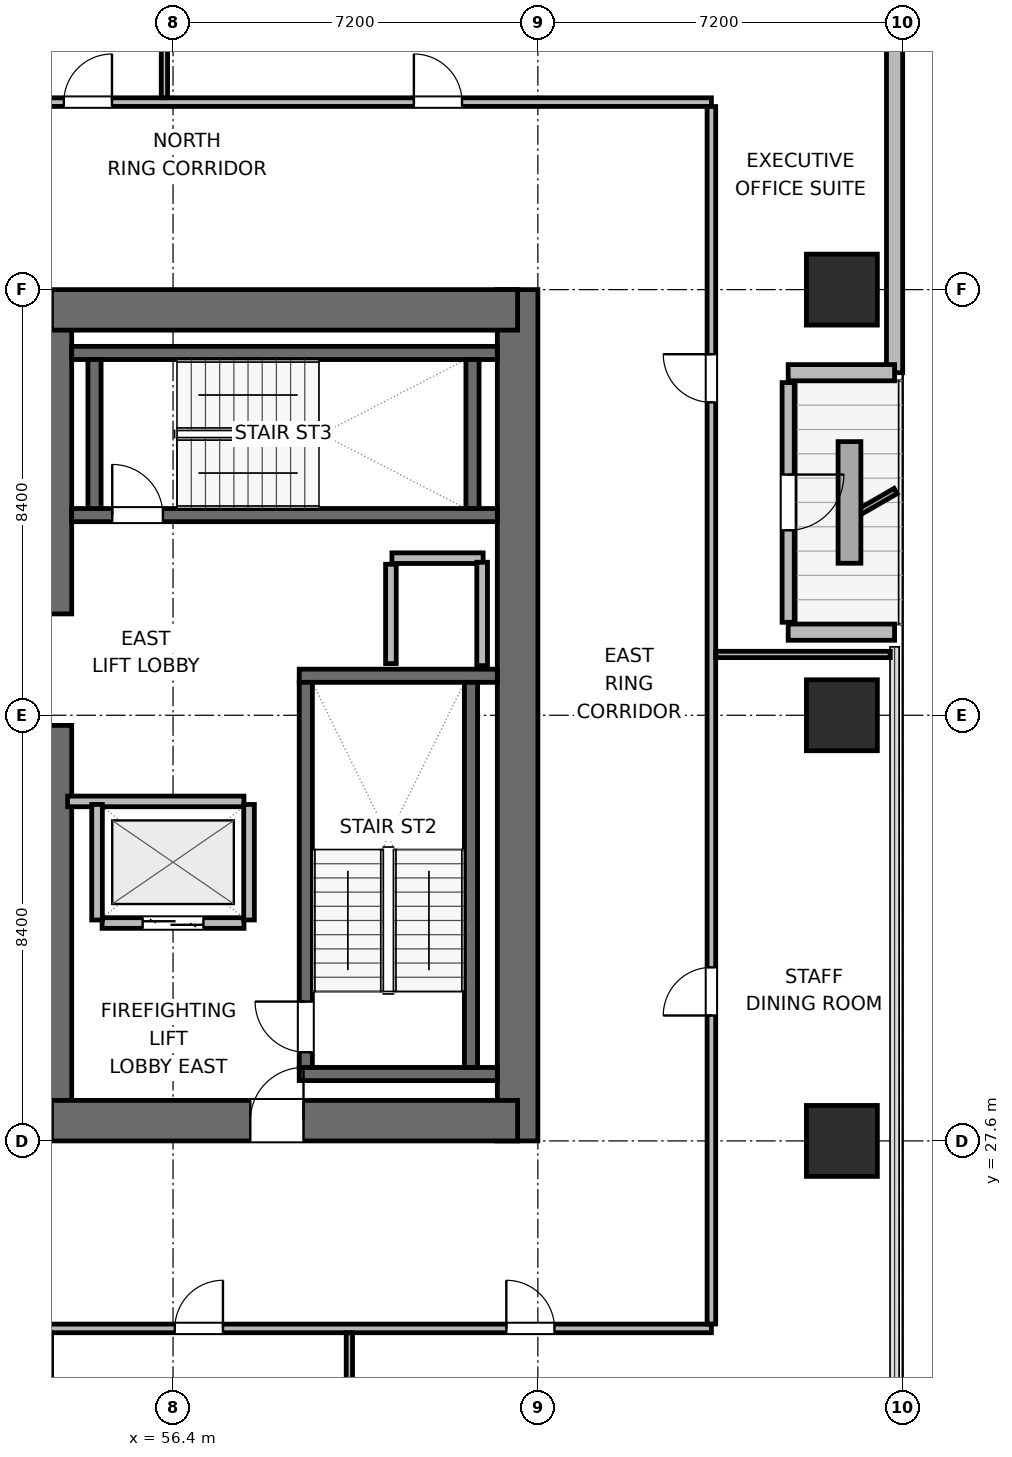
"""IFC4 building model, lengths in metres.
Left out: names, types, materials, properties, quantities, classifications, styles, units other than length and angle.
Written with IfcOpenShell. Run it as: python <this file> out.ifc"""

import sys

from ifc_helpers import new_model, si_unit, direction, frame, frame_2d, origin, origin_2d, place, context, subcontext, project, spatial, rectangle, extrude, element, fill, save


model = new_model("IFC4")
c1 = context("Model", 3, precision=1e-05, world=origin(), true_north=direction((0.0, 1.0)))
c2 = subcontext(c1, "Body", "Model", "MODEL_VIEW")
j1 = project(units=[si_unit("LENGTHUNIT", "METRE"), si_unit("PLANEANGLEUNIT", "RADIAN")], contexts=[c1])
p1 = place(None, origin())
s1 = spatial("IfcSite", under=j1, at=p1, CompositionType="ELEMENT")
p2 = place(p1, origin())
s2 = spatial("IfcBuilding", under=s1, at=p2, CompositionType="ELEMENT")
p3 = place(p2, frame((0.0, 0.0, 105.3)))
s3 = spatial("IfcBuildingStorey", under=s2, at=p3, CompositionType="ELEMENT", Elevation=105.3)
p4 = place(p3, frame((54.0, 28.0, 0.0), z_axis=(0.0, 0.0, 1.0), x_axis=(0.0, 1.0, 0.0)))
e1 = element("IfcWall", 1, at=p4, inside=s3, PredefinedType="SHEAR", context=c2, shape_type="SweptSolid", body=[
    extrude(rectangle(XDim=7.8, YDim=0.8, at=frame_2d((3.9, 0.0))), origin(), (0.0, 0.0, 1.0), 3.9),
])
p5 = place(p3, frame((54.0, 38.0, 0.0), z_axis=(0.0, 0.0, 1.0), x_axis=(0.0, 1.0, 0.0)))
e2 = element("IfcWall", 2, at=p5, inside=s3, PredefinedType="SHEAR", context=c2, shape_type="SweptSolid", body=[
    extrude(rectangle(XDim=6.0, YDim=0.8, at=frame_2d((3.0, 0.0))), origin(), (0.0, 0.0, 1.0), 3.9),
])
p6 = place(p3, frame((63.2, 27.6, 0.0), z_axis=(0.0, 0.0, 1.0), x_axis=(0.0, 1.0, 0.0)))
e3 = element("IfcWall", 3, at=p6, inside=s3, PredefinedType="SHEAR", context=c2, shape_type="SweptSolid", body=[
    extrude(rectangle(XDim=16.8, YDim=0.8, at=frame_2d((8.4, 0.0))), origin(), (0.0, 0.0, 1.0), 3.9),
])
p7 = place(p3, frame((54.0, 28.0, 0.0), z_axis=(0.0, 0.0, 1.0), x_axis=(1.0, 0.0, 0.0)))
e4 = element("IfcWall", 4, at=p7, inside=s3, PredefinedType="SHEAR", context=c2, shape_type="SweptSolid", body=[
    extrude(rectangle(XDim=9.2, YDim=0.8, at=frame_2d((4.6, 0.0))), origin(), (0.0, 0.0, 1.0), 3.9),
])
p8 = place(p7, frame((3.925, 0.0, 0.0)))
e5 = element("IfcOpeningElement", 5, at=p8, cuts=e4, PredefinedType="OPENING", context=c2, shape_type="SweptSolid", body=[
    extrude(rectangle(XDim=1.05, YDim=2.04, at=frame_2d((0.525, 1.02))), frame((0.0, 0.41, 0.0), z_axis=(0.0, -1.0, 0.0), x_axis=(1.0, 0.0, 0.0)), (0.0, 0.0, 1.0), 0.82),
])
p9 = place(p3, frame((54.0, 44.0, 0.0), z_axis=(0.0, 0.0, 1.0), x_axis=(1.0, 0.0, 0.0)))
e6 = element("IfcWall", 6, at=p9, inside=s3, PredefinedType="SHEAR", context=c2, shape_type="SweptSolid", body=[
    extrude(rectangle(XDim=9.2, YDim=0.8, at=frame_2d((4.6, 0.0))), origin(), (0.0, 0.0, 1.0), 3.9),
])
for number, where, z_axis, x_axis in (
    (7, (58.89, 28.92, 0.0), (0.0, 0.0, 1.0), (1.0, 0.0, 0.0)),
    (8, (58.89, 36.78, 0.0), (0.0, 0.0, 1.0), (1.0, 0.0, 0.0)),
):
    element("IfcWall", number, at=place(p3, frame(where, z_axis=z_axis, x_axis=x_axis)), inside=s3, PredefinedType="SHEAR", context=c2, shape_type="SweptSolid", body=[
        extrude(rectangle(XDim=3.91, YDim=0.26, at=frame_2d((1.955, 0.0))), origin(), (0.0, 0.0, 1.0), 3.9),
    ])
p10 = place(p3, frame((59.02, 29.05, 0.0), z_axis=(0.0, 0.0, 1.0), x_axis=(0.0, 1.0, 0.0)))
e9 = element("IfcWall", 9, at=p10, inside=s3, PredefinedType="SHEAR", context=c2, shape_type="SweptSolid", body=[
    extrude(rectangle(XDim=7.6, YDim=0.26, at=frame_2d((3.8, 0.0))), origin(), (0.0, 0.0, 1.0), 3.9),
])
p11 = place(p10, frame((0.3, 0.0, 0.0)))
e10 = element("IfcOpeningElement", 10, at=p11, cuts=e9, PredefinedType="OPENING", context=c2, shape_type="SweptSolid", body=[
    extrude(rectangle(XDim=1.0, YDim=2.04, at=frame_2d((0.5, 1.02))), frame((0.0, 0.14, 0.0), z_axis=(0.0, -1.0, 0.0), x_axis=(1.0, 0.0, 0.0)), (0.0, 0.0, 1.0), 0.28),
])
p12 = place(p3, frame((62.28, 29.05, 0.0), z_axis=(0.0, 0.0, 1.0), x_axis=(0.0, 1.0, 0.0)))
e11 = element("IfcWall", 11, at=p12, inside=s3, PredefinedType="SHEAR", context=c2, shape_type="SweptSolid", body=[
    extrude(rectangle(XDim=7.6, YDim=0.26, at=frame_2d((3.8, 0.0))), origin(), (0.0, 0.0, 1.0), 3.9),
])
p13 = place(p3, frame((54.4, 39.95, 0.0), z_axis=(0.0, 0.0, 1.0), x_axis=(1.0, 0.0, 0.0)))
e12 = element("IfcWall", 12, at=p13, inside=s3, PredefinedType="SHEAR", context=c2, shape_type="SweptSolid", body=[
    extrude(rectangle(XDim=8.4, YDim=0.26, at=frame_2d((4.2, 0.0))), origin(), (0.0, 0.0, 1.0), 3.9),
])
p14 = place(p13, frame((0.8, 0.0, 0.0)))
e13 = element("IfcOpeningElement", 13, at=p14, cuts=e12, PredefinedType="OPENING", context=c2, shape_type="SweptSolid", body=[
    extrude(rectangle(XDim=1.0, YDim=2.04, at=frame_2d((0.5, 1.02))), frame((0.0, 0.14, 0.0), z_axis=(0.0, -1.0, 0.0), x_axis=(1.0, 0.0, 0.0)), (0.0, 0.0, 1.0), 0.28),
])
p15 = place(p3, frame((54.4, 43.15, 0.0), z_axis=(0.0, 0.0, 1.0), x_axis=(1.0, 0.0, 0.0)))
e14 = element("IfcWall", 14, at=p15, inside=s3, PredefinedType="SHEAR", context=c2, shape_type="SweptSolid", body=[
    extrude(rectangle(XDim=8.4, YDim=0.26, at=frame_2d((4.2, 0.0))), origin(), (0.0, 0.0, 1.0), 3.9),
])
for number, where, z_axis, x_axis in (
    (15, (54.85, 40.08, 0.0), (0.0, 0.0, 1.0), (0.0, 1.0, 0.0)),
    (16, (62.31, 40.08, 0.0), (0.0, 0.0, 1.0), (0.0, 1.0, 0.0)),
):
    element("IfcWall", number, at=place(p3, frame(where, z_axis=z_axis, x_axis=x_axis)), inside=s3, PredefinedType="SHEAR", context=c2, shape_type="SweptSolid", body=[
        extrude(rectangle(XDim=2.94, YDim=0.26, at=frame_2d((1.47, 0.0))), origin(), (0.0, 0.0, 1.0), 3.9),
    ])
for number, where, z_axis, x_axis in (
    (17, (69.6, 27.6, 0.0), (0.0, 0.0, 1.0), (1.0, 0.0, 0.0)),
    (18, (69.6, 36.0, 0.0), (0.0, 0.0, 1.0), (1.0, 0.0, 0.0)),
    (19, (69.6, 44.4, 0.0), (0.0, 0.0, 1.0), (1.0, 0.0, 0.0)),
):
    element("IfcColumn", number, at=place(p3, frame(where, z_axis=z_axis, x_axis=x_axis)), inside=s3, PredefinedType="COLUMN", context=c2, shape_type="SweptSolid", body=[
        extrude(rectangle(XDim=1.4, YDim=1.4, at=origin_2d()), origin(), (0.0, 0.0, 1.0), 3.9),
    ])
p16 = place(p3, frame((70.64, 56.979, 0.0), z_axis=(0.0, 0.0, 1.0), x_axis=(0.0, -1.0, 0.0)))
e20 = element("IfcWall", 20, at=p16, inside=s3, PredefinedType="SOLIDWALL", context=c2, shape_type="SweptSolid", body=[
    extrude(rectangle(XDim=14.219, YDim=0.32, at=frame_2d((7.109, 0.0))), origin(), (0.0, 0.0, 1.0), 3.64),
])
p17 = place(p3, frame((70.64, 42.76, 0.0), z_axis=(0.0, 0.0, 1.0), x_axis=(-1.0, 0.0, 0.0)))
e21 = element("IfcWall", 21, at=p17, inside=s3, PredefinedType="SOLIDWALL", context=c2, shape_type="SweptSolid", body=[
    extrude(rectangle(XDim=2.1, YDim=0.32, at=frame_2d((1.05, 0.0))), origin(), (0.0, 0.0, 1.0), 2.875),
])
p18 = place(p3, frame((68.54, 42.565, 0.0), z_axis=(0.0, 0.0, 1.0), x_axis=(0.0, -1.0, 0.0)))
e22 = element("IfcWall", 22, at=p18, inside=s3, PredefinedType="SOLIDWALL", context=c2, shape_type="SweptSolid", body=[
    extrude(rectangle(XDim=4.73, YDim=0.24, at=frame_2d((2.365, 0.0))), origin(), (0.0, 0.0, 1.0), 3.162),
])
p19 = place(p18, frame((1.815, 0.0, 0.0)))
e23 = element("IfcOpeningElement", 23, at=p19, cuts=e22, PredefinedType="OPENING", context=c2, shape_type="SweptSolid", body=[
    extrude(rectangle(XDim=1.1, YDim=2.04, at=frame_2d((0.55, 1.02))), frame((0.0, 0.13, 0.0), z_axis=(0.0, -1.0, 0.0), x_axis=(1.0, 0.0, 0.0)), (0.0, 0.0, 1.0), 0.26),
])
p20 = place(p3, frame((68.54, 37.64, 0.0), z_axis=(0.0, 0.0, 1.0), x_axis=(1.0, 0.0, 0.0)))
e24 = element("IfcWall", 24, at=p20, inside=s3, PredefinedType="SOLIDWALL", context=c2, shape_type="SweptSolid", body=[
    extrude(rectangle(XDim=2.1, YDim=0.32, at=frame_2d((1.05, 0.0))), origin(), (0.0, 0.0, 1.0), 2.875),
])
p21 = place(p3, frame((60.72, 39.1, 0.0), z_axis=(0.0, 0.0, 1.0), x_axis=(1.0, 0.0, 0.0)))
e25 = element("IfcWall", 25, at=p21, inside=s3, PredefinedType="PARTITIONING", context=c2, shape_type="SweptSolid", body=[
    extrude(rectangle(XDim=1.8, YDim=0.21, at=frame_2d((0.9, 0.0))), origin(), (0.0, 0.0, 1.0), 3.64),
])
p22 = place(p3, frame((60.7, 37.02, 0.0), z_axis=(0.0, 0.0, 1.0), x_axis=(0.0, 1.0, 0.0)))
e26 = element("IfcWall", 26, at=p22, inside=s3, PredefinedType="PARTITIONING", context=c2, shape_type="SweptSolid", body=[
    extrude(rectangle(XDim=1.96, YDim=0.21, at=frame_2d((0.98, 0.0))), origin(), (0.0, 0.0, 1.0), 3.64),
])
p23 = place(p3, frame((62.5, 36.98, 0.0), z_axis=(0.0, 0.0, 1.0), x_axis=(0.0, 1.0, 0.0)))
e27 = element("IfcWall", 27, at=p23, inside=s3, PredefinedType="PARTITIONING", context=c2, shape_type="SweptSolid", body=[
    extrude(rectangle(XDim=2.04, YDim=0.21, at=frame_2d((1.02, 0.0))), origin(), (0.0, 0.0, 1.0), 3.64),
])
p24 = place(p3, frame((55.0, 31.9, 0.0), z_axis=(0.0, 0.0, 1.0), x_axis=(1.0, 0.0, 0.0)))
e28 = element("IfcWall", 28, at=p24, inside=s3, PredefinedType="PARTITIONING", context=c2, shape_type="SweptSolid", body=[
    extrude(rectangle(XDim=2.8, YDim=0.21, at=frame_2d((1.4, 0.0))), origin(), (0.0, 0.0, 1.0), 3.64),
])
p25 = place(p24, frame((0.8, 0.0, 0.0)))
e29 = element("IfcOpeningElement", 29, at=p25, cuts=e28, PredefinedType="OPENING", context=c2, shape_type="SweptSolid", body=[
    extrude(rectangle(XDim=1.2, YDim=2.04, at=frame_2d((0.6, 1.02))), frame((0.0, 0.115, 0.0), z_axis=(0.0, -1.0, 0.0), x_axis=(1.0, 0.0, 0.0)), (0.0, 0.0, 1.0), 0.23),
])
p26 = place(p3, frame((54.32, 34.3, 0.0), z_axis=(0.0, 0.0, 1.0), x_axis=(1.0, 0.0, 0.0)))
e30 = element("IfcWall", 30, at=p26, inside=s3, PredefinedType="PARTITIONING", context=c2, shape_type="SweptSolid", body=[
    extrude(rectangle(XDim=3.48, YDim=0.21, at=frame_2d((1.74, 0.0))), origin(), (0.0, 0.0, 1.0), 3.64),
])
for number, where, z_axis, x_axis in (
    (31, (54.9, 31.96, 0.0), (0.0, 0.0, 1.0), (0.0, 1.0, 0.0)),
    (32, (57.9, 31.96, 0.0), (0.0, 0.0, 1.0), (0.0, 1.0, 0.0)),
):
    element("IfcWall", number, at=place(p3, frame(where, z_axis=z_axis, x_axis=x_axis)), inside=s3, PredefinedType="PARTITIONING", context=c2, shape_type="SweptSolid", body=[
        extrude(rectangle(XDim=2.28, YDim=0.21, at=frame_2d((1.14, 0.0))), origin(), (0.0, 0.0, 1.0), 3.64),
    ])
p27 = place(p3, frame((28.975, 23.9, 0.0), z_axis=(0.0, 0.0, 1.0), x_axis=(1.0, 0.0, 0.0)))
e33 = element("IfcWall", 33, at=p27, inside=s3, PredefinedType="PARTITIONING", context=c2, shape_type="SweptSolid", body=[
    extrude(rectangle(XDim=38.05, YDim=0.17, at=frame_2d((19.025, 0.0))), origin(), (0.0, 0.0, 1.0), 3.64),
])
p28 = place(p27, frame((3.097, 0.0, 0.0)))
e34 = element("IfcOpeningElement", 34, at=p28, cuts=e33, PredefinedType="OPENING", context=c2, shape_type="SweptSolid", body=[
    extrude(rectangle(XDim=0.95, YDim=2.04, at=frame_2d((0.475, 1.02))), frame((0.0, 0.095, 0.0), z_axis=(0.0, -1.0, 0.0), x_axis=(1.0, 0.0, 0.0)), (0.0, 0.0, 1.0), 0.19),
])
p29 = place(p27, frame((9.64, 0.0, 0.0)))
e35 = element("IfcOpeningElement", 35, at=p29, cuts=e33, PredefinedType="OPENING", context=c2, shape_type="SweptSolid", body=[
    extrude(rectangle(XDim=0.95, YDim=2.04, at=frame_2d((0.475, 1.02))), frame((0.0, 0.095, 0.0), z_axis=(0.0, -1.0, 0.0), x_axis=(1.0, 0.0, 0.0)), (0.0, 0.0, 1.0), 0.19),
])
p30 = place(p27, frame((15.58, 0.0, 0.0)))
e36 = element("IfcOpeningElement", 36, at=p30, cuts=e33, PredefinedType="OPENING", context=c2, shape_type="SweptSolid", body=[
    extrude(rectangle(XDim=0.95, YDim=2.04, at=frame_2d((0.475, 1.02))), frame((0.0, 0.095, 0.0), z_axis=(0.0, -1.0, 0.0), x_axis=(1.0, 0.0, 0.0)), (0.0, 0.0, 1.0), 0.19),
])
p31 = place(p27, frame((21.52, 0.0, 0.0)))
e37 = element("IfcOpeningElement", 37, at=p31, cuts=e33, PredefinedType="OPENING", context=c2, shape_type="SweptSolid", body=[
    extrude(rectangle(XDim=0.95, YDim=2.04, at=frame_2d((0.475, 1.02))), frame((0.0, 0.095, 0.0), z_axis=(0.0, -1.0, 0.0), x_axis=(1.0, 0.0, 0.0)), (0.0, 0.0, 1.0), 0.19),
])
p32 = place(p27, frame((27.46, 0.0, 0.0)))
e38 = element("IfcOpeningElement", 38, at=p32, cuts=e33, PredefinedType="OPENING", context=c2, shape_type="SweptSolid", body=[
    extrude(rectangle(XDim=0.95, YDim=2.04, at=frame_2d((0.475, 1.02))), frame((0.0, 0.095, 0.0), z_axis=(0.0, -1.0, 0.0), x_axis=(1.0, 0.0, 0.0)), (0.0, 0.0, 1.0), 0.19),
])
p33 = place(p27, frame((34.003, 0.0, 0.0)))
e39 = element("IfcOpeningElement", 39, at=p33, cuts=e33, PredefinedType="OPENING", context=c2, shape_type="SweptSolid", body=[
    extrude(rectangle(XDim=0.95, YDim=2.04, at=frame_2d((0.475, 1.02))), frame((0.0, 0.095, 0.0), z_axis=(0.0, -1.0, 0.0), x_axis=(1.0, 0.0, 0.0)), (0.0, 0.0, 1.0), 0.19),
])
p34 = place(p3, frame((28.975, 48.1, 0.0), z_axis=(0.0, 0.0, 1.0), x_axis=(1.0, 0.0, 0.0)))
e40 = element("IfcWall", 40, at=p34, inside=s3, PredefinedType="PARTITIONING", context=c2, shape_type="SweptSolid", body=[
    extrude(rectangle(XDim=38.05, YDim=0.17, at=frame_2d((19.025, 0.0))), origin(), (0.0, 0.0, 1.0), 3.64),
])
p35 = place(p34, frame((4.923, 0.0, 0.0)))
e41 = element("IfcOpeningElement", 41, at=p35, cuts=e40, PredefinedType="OPENING", context=c2, shape_type="SweptSolid", body=[
    extrude(rectangle(XDim=0.95, YDim=2.04, at=frame_2d((0.475, 1.02))), frame((0.0, 0.095, 0.0), z_axis=(0.0, -1.0, 0.0), x_axis=(1.0, 0.0, 0.0)), (0.0, 0.0, 1.0), 0.19),
])
p36 = place(p34, frame((13.34, 0.0, 0.0)))
e42 = element("IfcOpeningElement", 42, at=p36, cuts=e40, PredefinedType="OPENING", context=c2, shape_type="SweptSolid", body=[
    extrude(rectangle(XDim=0.95, YDim=2.04, at=frame_2d((0.475, 1.02))), frame((0.0, 0.095, 0.0), z_axis=(0.0, -1.0, 0.0), x_axis=(1.0, 0.0, 0.0)), (0.0, 0.0, 1.0), 0.19),
])
p37 = place(p34, frame((20.06, 0.0, 0.0)))
e43 = element("IfcOpeningElement", 43, at=p37, cuts=e40, PredefinedType="OPENING", context=c2, shape_type="SweptSolid", body=[
    extrude(rectangle(XDim=0.95, YDim=2.04, at=frame_2d((0.475, 1.02))), frame((0.0, 0.095, 0.0), z_axis=(0.0, -1.0, 0.0), x_axis=(1.0, 0.0, 0.0)), (0.0, 0.0, 1.0), 0.19),
])
p38 = place(p34, frame((25.27, 0.0, 0.0)))
e44 = element("IfcOpeningElement", 44, at=p38, cuts=e40, PredefinedType="OPENING", context=c2, shape_type="SweptSolid", body=[
    extrude(rectangle(XDim=0.95, YDim=2.04, at=frame_2d((0.475, 1.02))), frame((0.0, 0.095, 0.0), z_axis=(0.0, -1.0, 0.0), x_axis=(1.0, 0.0, 0.0)), (0.0, 0.0, 1.0), 0.19),
])
p39 = place(p34, frame((32.178, 0.0, 0.0)))
e45 = element("IfcOpeningElement", 45, at=p39, cuts=e40, PredefinedType="OPENING", context=c2, shape_type="SweptSolid", body=[
    extrude(rectangle(XDim=0.95, YDim=2.04, at=frame_2d((0.475, 1.02))), frame((0.0, 0.095, 0.0), z_axis=(0.0, -1.0, 0.0), x_axis=(1.0, 0.0, 0.0)), (0.0, 0.0, 1.0), 0.19),
])
p40 = place(p3, frame((67.025, 23.987, 0.0), z_axis=(0.0, 0.0, 1.0), x_axis=(0.0, 1.0, 0.0)))
e46 = element("IfcWall", 46, at=p40, inside=s3, PredefinedType="PARTITIONING", context=c2, shape_type="SweptSolid", body=[
    extrude(rectangle(XDim=24.026, YDim=0.17, at=frame_2d((12.013, 0.0))), origin(), (0.0, 0.0, 1.0), 3.64),
])
p41 = place(p40, frame((6.088, 0.0, 0.0)))
e47 = element("IfcOpeningElement", 47, at=p41, cuts=e46, PredefinedType="OPENING", context=c2, shape_type="SweptSolid", body=[
    extrude(rectangle(XDim=0.95, YDim=2.04, at=frame_2d((0.475, 1.02))), frame((0.0, 0.095, 0.0), z_axis=(0.0, -1.0, 0.0), x_axis=(1.0, 0.0, 0.0)), (0.0, 0.0, 1.0), 0.19),
])
p42 = place(p40, frame((18.188, 0.0, 0.0)))
e48 = element("IfcOpeningElement", 48, at=p42, cuts=e46, PredefinedType="OPENING", context=c2, shape_type="SweptSolid", body=[
    extrude(rectangle(XDim=0.95, YDim=2.04, at=frame_2d((0.475, 1.02))), frame((0.0, 0.095, 0.0), z_axis=(0.0, -1.0, 0.0), x_axis=(1.0, 0.0, 0.0)), (0.0, 0.0, 1.0), 0.19),
])
p43 = place(p3, frame((59.88, 9.915, 0.0), z_axis=(0.0, 0.0, 1.0), x_axis=(0.0, 1.0, 0.0)))
e49 = element("IfcWall", 49, at=p43, inside=s3, PredefinedType="PARTITIONING", context=c2, shape_type="SweptSolid", body=[
    extrude(rectangle(XDim=13.898, YDim=0.125, at=frame_2d((6.949, 0.0))), origin(), (0.0, 0.0, 1.0), 3.64),
])
p44 = place(p3, frame((56.23, 48.187, 0.0), z_axis=(0.0, 0.0, 1.0), x_axis=(0.0, 1.0, 0.0)))
e50 = element("IfcWall", 50, at=p44, inside=s3, PredefinedType="PARTITIONING", context=c2, shape_type="SweptSolid", body=[
    extrude(rectangle(XDim=13.898, YDim=0.125, at=frame_2d((6.949, 0.0))), origin(), (0.0, 0.0, 1.0), 3.003),
])
p45 = place(p3, frame((67.112, 37.2, 0.0), z_axis=(0.0, 0.0, 1.0), x_axis=(1.0, 0.0, 0.0)))
e51 = element("IfcWall", 51, at=p45, inside=s3, PredefinedType="PARTITIONING", context=c2, shape_type="SweptSolid", body=[
    extrude(rectangle(XDim=3.443, YDim=0.125, at=frame_2d((1.721, 0.0))), origin(), (0.0, 0.0, 1.0), 3.64),
])
p46 = place(p19, origin())
e52 = element("IfcDoor", 52, at=p46, inside=s3, OperationType="SINGLE_SWING_LEFT", PredefinedType="DOOR", context=c2, shape_type="SweptSolid", body=[
    extrude(rectangle(XDim=1.1, YDim=2.04, at=frame_2d((0.55, 1.02))), frame((0.0, 0.025, 0.0), z_axis=(0.0, -1.0, 0.0), x_axis=(1.0, 0.0, 0.0)), (0.0, 0.0, 1.0), 0.05),
])
fill(e23, e52)
p47 = place(p11, origin())
e53 = element("IfcDoor", 53, at=p47, inside=s3, OperationType="SINGLE_SWING_RIGHT", PredefinedType="DOOR", context=c2, shape_type="SweptSolid", body=[
    extrude(rectangle(XDim=1.0, YDim=2.04, at=frame_2d((0.5, 1.02))), frame((0.0, 0.025, 0.0), z_axis=(0.0, -1.0, 0.0), x_axis=(1.0, 0.0, 0.0)), (0.0, 0.0, 1.0), 0.05),
])
fill(e10, e53)
p48 = place(p14, origin())
e54 = element("IfcDoor", 54, at=p48, inside=s3, OperationType="SINGLE_SWING_LEFT", PredefinedType="DOOR", context=c2, shape_type="SweptSolid", body=[
    extrude(rectangle(XDim=1.0, YDim=2.04, at=frame_2d((0.5, 1.02))), frame((0.0, 0.025, 0.0), z_axis=(0.0, -1.0, 0.0), x_axis=(1.0, 0.0, 0.0)), (0.0, 0.0, 1.0), 0.05),
])
fill(e13, e54)
p49 = place(p25, origin())
e55 = element("IfcDoor", 55, at=p49, inside=s3, OperationType="DOUBLE_DOOR_SLIDING", PredefinedType="DOOR", context=c2, shape_type="SweptSolid", body=[
    extrude(rectangle(XDim=1.2, YDim=2.04, at=frame_2d((0.6, 1.02))), frame((0.0, 0.025, 0.0), z_axis=(0.0, -1.0, 0.0), x_axis=(1.0, 0.0, 0.0)), (0.0, 0.0, 1.0), 0.05),
])
fill(e29, e55)
p50 = place(p8, origin())
e56 = element("IfcDoor", 56, at=p50, inside=s3, OperationType="SINGLE_SWING_RIGHT", PredefinedType="DOOR", context=c2, shape_type="SweptSolid", body=[
    extrude(rectangle(XDim=1.05, YDim=2.04, at=frame_2d((0.525, 1.02))), frame((0.0, 0.025, 0.0), z_axis=(0.0, -1.0, 0.0), x_axis=(1.0, 0.0, 0.0)), (0.0, 0.0, 1.0), 0.05),
])
fill(e5, e56)
p51 = place(p32, origin())
e57 = element("IfcDoor", 57, at=p51, inside=s3, OperationType="SINGLE_SWING_RIGHT", PredefinedType="DOOR", context=c2, shape_type="SweptSolid", body=[
    extrude(rectangle(XDim=0.95, YDim=2.04, at=frame_2d((0.475, 1.02))), frame((0.0, 0.025, 0.0), z_axis=(0.0, -1.0, 0.0), x_axis=(1.0, 0.0, 0.0)), (0.0, 0.0, 1.0), 0.05),
])
fill(e38, e57)
p52 = place(p33, origin())
e58 = element("IfcDoor", 58, at=p52, inside=s3, OperationType="SINGLE_SWING_LEFT", PredefinedType="DOOR", context=c2, shape_type="SweptSolid", body=[
    extrude(rectangle(XDim=0.95, YDim=2.04, at=frame_2d((0.475, 1.02))), frame((0.0, 0.025, 0.0), z_axis=(0.0, -1.0, 0.0), x_axis=(1.0, 0.0, 0.0)), (0.0, 0.0, 1.0), 0.05),
])
fill(e39, e58)
p53 = place(p38, origin())
e59 = element("IfcDoor", 59, at=p53, inside=s3, OperationType="SINGLE_SWING_RIGHT", PredefinedType="DOOR", context=c2, shape_type="SweptSolid", body=[
    extrude(rectangle(XDim=0.95, YDim=2.04, at=frame_2d((0.475, 1.02))), frame((0.0, 0.025, 0.0), z_axis=(0.0, -1.0, 0.0), x_axis=(1.0, 0.0, 0.0)), (0.0, 0.0, 1.0), 0.05),
])
fill(e44, e59)
p54 = place(p39, origin())
e60 = element("IfcDoor", 60, at=p54, inside=s3, OperationType="SINGLE_SWING_LEFT", PredefinedType="DOOR", context=c2, shape_type="SweptSolid", body=[
    extrude(rectangle(XDim=0.95, YDim=2.04, at=frame_2d((0.475, 1.02))), frame((0.0, 0.025, 0.0), z_axis=(0.0, -1.0, 0.0), x_axis=(1.0, 0.0, 0.0)), (0.0, 0.0, 1.0), 0.05),
])
fill(e45, e60)
p55 = place(p41, origin())
e61 = element("IfcDoor", 61, at=p55, inside=s3, OperationType="SINGLE_SWING_LEFT", PredefinedType="DOOR", context=c2, shape_type="SweptSolid", body=[
    extrude(rectangle(XDim=0.95, YDim=2.04, at=frame_2d((0.475, 1.02))), frame((0.0, 0.025, 0.0), z_axis=(0.0, -1.0, 0.0), x_axis=(1.0, 0.0, 0.0)), (0.0, 0.0, 1.0), 0.05),
])
fill(e47, e61)
p56 = place(p42, origin())
e62 = element("IfcDoor", 62, at=p56, inside=s3, OperationType="SINGLE_SWING_RIGHT", PredefinedType="DOOR", context=c2, shape_type="SweptSolid", body=[
    extrude(rectangle(XDim=0.95, YDim=2.04, at=frame_2d((0.475, 1.02))), frame((0.0, 0.025, 0.0), z_axis=(0.0, -1.0, 0.0), x_axis=(1.0, 0.0, 0.0)), (0.0, 0.0, 1.0), 0.05),
])
fill(e48, e62)
save(model, sys.argv[1])
